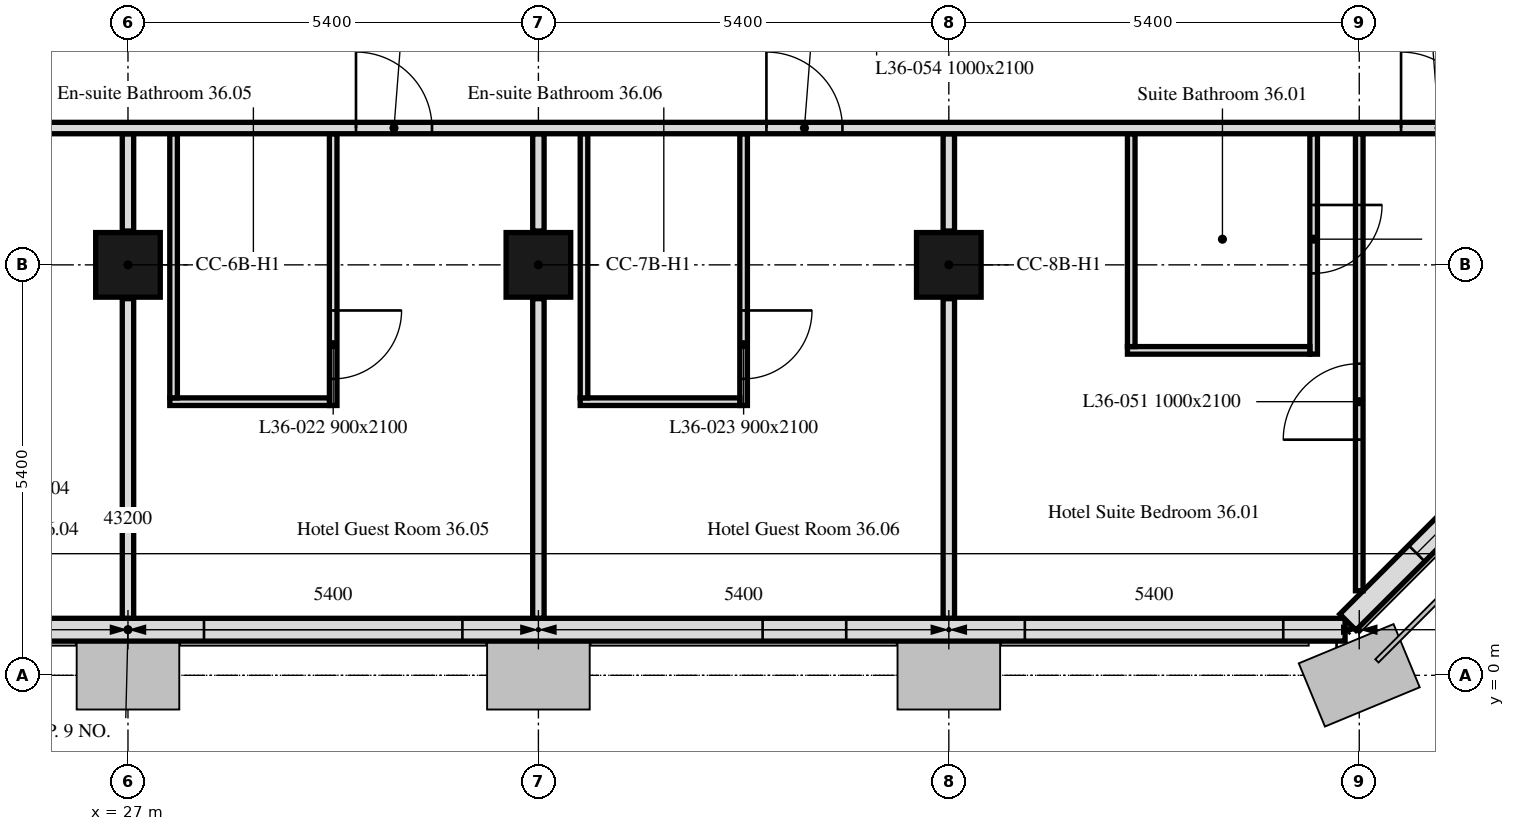
"""IFC4 building model, lengths in metres.
Left out: names, types, materials, properties, quantities, classifications, styles, units other than length and angle.
Written with IfcOpenShell. Run it as: python <this file> out.ifc"""

import sys

from ifc_helpers import new_model, si_unit, direction, frame, frame_2d, origin, origin_2d, place, context, subcontext, project, spatial, rectangle, extrude, element, fill, save


model = new_model("IFC4")
c1 = context("Model", 3, precision=1e-05, world=origin(), true_north=direction((0.0, 1.0)))
c2 = subcontext(c1, "Body", "Model", "MODEL_VIEW")
j1 = project(units=[si_unit("LENGTHUNIT", "METRE"), si_unit("PLANEANGLEUNIT", "RADIAN")], contexts=[c1])
p1 = place(None, origin())
s1 = spatial("IfcSite", under=j1, at=p1, CompositionType="ELEMENT")
p2 = place(p1, origin())
s2 = spatial("IfcBuilding", under=s1, at=p2, CompositionType="ELEMENT")
p3 = place(p2, frame((0.0, 0.0, 156.1)))
s3 = spatial("IfcBuildingStorey", under=s2, at=p3, CompositionType="ELEMENT", Elevation=156.1)
for number, where, z_axis, x_axis in (
    (1, (27.0, 5.4, 0.0), (0.0, 0.0, 1.0), (1.0, 0.0, 0.0)),
    (2, (32.4, 5.4, 0.0), (0.0, 0.0, 1.0), (1.0, 0.0, 0.0)),
    (3, (37.8, 5.4, 0.0), (0.0, 0.0, 1.0), (1.0, 0.0, 0.0)),
):
    element("IfcColumn", number, at=place(p3, frame(where, z_axis=z_axis, x_axis=x_axis)), inside=s3, PredefinedType="COLUMN", context=c2, shape_type="SweptSolid", body=[
        extrude(rectangle(XDim=0.85, YDim=0.85, at=origin_2d()), origin(), (0.0, 0.0, 1.0), 3.0),
    ])
p4 = place(p3, frame((10.986, 0.6, 0.0), z_axis=(0.0, 0.0, 1.0), x_axis=(1.0, 0.0, 0.0)))
e4 = element("IfcWall", 4, at=p4, inside=s3, PredefinedType="SOLIDWALL", context=c2, shape_type="SweptSolid", body=[
    extrude(rectangle(XDim=32.027, YDim=0.3, at=frame_2d((16.014, 0.0))), origin(), (0.0, 0.0, 1.0), 3.0),
])
p5 = place(p4, frame((2.764, 0.0, 0.9)))
e5 = element("IfcOpeningElement", 5, at=p5, cuts=e4, PredefinedType="OPENING", context=c2, shape_type="SweptSolid", body=[
    extrude(rectangle(XDim=1.1, YDim=1.7, at=frame_2d((0.55, 0.85))), frame((0.0, 0.16, 0.0), z_axis=(0.0, -1.0, 0.0), x_axis=(1.0, 0.0, 0.0)), (0.0, 0.0, 1.0), 0.32),
])
p6 = place(p4, frame((6.214, 0.0, 0.9)))
e6 = element("IfcOpeningElement", 6, at=p6, cuts=e4, PredefinedType="OPENING", context=c2, shape_type="SweptSolid", body=[
    extrude(rectangle(XDim=3.4, YDim=1.7, at=frame_2d((1.7, 0.85))), frame((0.0, 0.16, 0.0), z_axis=(0.0, -1.0, 0.0), x_axis=(1.0, 0.0, 0.0)), (0.0, 0.0, 1.0), 0.32),
])
p7 = place(p4, frame((13.564, 0.0, 0.9)))
e7 = element("IfcOpeningElement", 7, at=p7, cuts=e4, PredefinedType="OPENING", context=c2, shape_type="SweptSolid", body=[
    extrude(rectangle(XDim=1.1, YDim=1.7, at=frame_2d((0.55, 0.85))), frame((0.0, 0.16, 0.0), z_axis=(0.0, -1.0, 0.0), x_axis=(1.0, 0.0, 0.0)), (0.0, 0.0, 1.0), 0.32),
])
p8 = place(p4, frame((17.014, 0.0, 0.9)))
e8 = element("IfcOpeningElement", 8, at=p8, cuts=e4, PredefinedType="OPENING", context=c2, shape_type="SweptSolid", body=[
    extrude(rectangle(XDim=3.4, YDim=1.7, at=frame_2d((1.7, 0.85))), frame((0.0, 0.16, 0.0), z_axis=(0.0, -1.0, 0.0), x_axis=(1.0, 0.0, 0.0)), (0.0, 0.0, 1.0), 0.32),
])
p9 = place(p4, frame((24.364, 0.0, 0.9)))
e9 = element("IfcOpeningElement", 9, at=p9, cuts=e4, PredefinedType="OPENING", context=c2, shape_type="SweptSolid", body=[
    extrude(rectangle(XDim=1.1, YDim=1.7, at=frame_2d((0.55, 0.85))), frame((0.0, 0.16, 0.0), z_axis=(0.0, -1.0, 0.0), x_axis=(1.0, 0.0, 0.0)), (0.0, 0.0, 1.0), 0.32),
])
p10 = place(p4, frame((27.814, 0.0, 0.9)))
e10 = element("IfcOpeningElement", 10, at=p10, cuts=e4, PredefinedType="OPENING", context=c2, shape_type="SweptSolid", body=[
    extrude(rectangle(XDim=3.4, YDim=1.7, at=frame_2d((1.7, 0.85))), frame((0.0, 0.16, 0.0), z_axis=(0.0, -1.0, 0.0), x_axis=(1.0, 0.0, 0.0)), (0.0, 0.0, 1.0), 0.32),
])
p11 = place(p3, frame((43.051, 0.699, 0.0), z_axis=(0.0, 0.0, 1.0), x_axis=(0.707106781187, 0.707106781187, 0.0)))
e11 = element("IfcWall", 11, at=p11, inside=s3, PredefinedType="SOLIDWALL", context=c2, shape_type="SweptSolid", body=[
    extrude(rectangle(XDim=6.86, YDim=0.3, at=frame_2d((3.43, 0.0))), origin(), (0.0, 0.0, 1.0), 3.0),
])
p12 = place(p11, frame((1.28, 0.0, 0.9)))
e12 = element("IfcOpeningElement", 12, at=p12, cuts=e11, PredefinedType="OPENING", context=c2, shape_type="SweptSolid", body=[
    extrude(rectangle(XDim=1.1, YDim=1.7, at=frame_2d((0.55, 0.85))), frame((0.0, 0.16, 0.0), z_axis=(0.0, -1.0, 0.0), x_axis=(1.0, 0.0, 0.0)), (0.0, 0.0, 1.0), 0.32),
])
p13 = place(p11, frame((4.48, 0.0, 0.9)))
e13 = element("IfcOpeningElement", 13, at=p13, cuts=e11, PredefinedType="OPENING", context=c2, shape_type="SweptSolid", body=[
    extrude(rectangle(XDim=1.1, YDim=1.7, at=frame_2d((0.55, 0.85))), frame((0.0, 0.16, 0.0), z_axis=(0.0, -1.0, 0.0), x_axis=(1.0, 0.0, 0.0)), (0.0, 0.0, 1.0), 0.32),
])
p14 = place(p3, frame((27.0, 0.751, 0.0), z_axis=(0.0, 0.0, 1.0), x_axis=(0.0, 1.0, 0.0)))
e14 = element("IfcWall", 14, at=p14, inside=s3, PredefinedType="PARTITIONING", context=c2, shape_type="SweptSolid", body=[
    extrude(rectangle(XDim=4.204, YDim=0.15, at=frame_2d((2.102, 0.0))), origin(), (0.0, 0.0, 1.0), 2.4),
])
p15 = place(p3, frame((27.0, 5.845, 0.0), z_axis=(0.0, 0.0, 1.0), x_axis=(0.0, 1.0, 0.0)))
e15 = element("IfcWall", 15, at=p15, inside=s3, PredefinedType="PARTITIONING", context=c2, shape_type="SweptSolid", body=[
    extrude(rectangle(XDim=1.28, YDim=0.15, at=frame_2d((0.64, 0.0))), origin(), (0.0, 0.0, 1.0), 2.4),
])
p16 = place(p3, frame((32.4, 0.751, 0.0), z_axis=(0.0, 0.0, 1.0), x_axis=(0.0, 1.0, 0.0)))
e16 = element("IfcWall", 16, at=p16, inside=s3, PredefinedType="PARTITIONING", context=c2, shape_type="SweptSolid", body=[
    extrude(rectangle(XDim=4.204, YDim=0.15, at=frame_2d((2.102, 0.0))), origin(), (0.0, 0.0, 1.0), 2.4),
])
p17 = place(p3, frame((32.4, 5.845, 0.0), z_axis=(0.0, 0.0, 1.0), x_axis=(0.0, 1.0, 0.0)))
e17 = element("IfcWall", 17, at=p17, inside=s3, PredefinedType="PARTITIONING", context=c2, shape_type="SweptSolid", body=[
    extrude(rectangle(XDim=1.28, YDim=0.15, at=frame_2d((0.64, 0.0))), origin(), (0.0, 0.0, 1.0), 2.4),
])
p18 = place(p3, frame((29.7, 7.125, 0.0), z_axis=(0.0, 0.0, 1.0), x_axis=(0.0, -1.0, 0.0)))
e18 = element("IfcWall", 18, at=p18, inside=s3, PredefinedType="PARTITIONING", context=c2, shape_type="SweptSolid", body=[
    extrude(rectangle(XDim=3.575, YDim=0.1, at=frame_2d((1.788, 0.0))), origin(), (0.0, 0.0, 1.0), 3.0),
])
p19 = place(p18, frame((2.325, 0.0, 0.0)))
e19 = element("IfcOpeningElement", 19, at=p19, cuts=e18, PredefinedType="OPENING", context=c2, shape_type="SweptSolid", body=[
    extrude(rectangle(XDim=0.9, YDim=2.1, at=frame_2d((0.45, 1.05))), frame((0.0, 0.05, 0.0), z_axis=(0.0, -1.0, 0.0), x_axis=(1.0, 0.0, 0.0)), (0.0, 0.0, 1.0), 0.1),
])
p20 = place(p3, frame((29.65, 3.6, 0.0), z_axis=(0.0, 0.0, 1.0), x_axis=(-1.0, 0.0, 0.0)))
e20 = element("IfcWall", 20, at=p20, inside=s3, PredefinedType="PARTITIONING", context=c2, shape_type="SweptSolid", body=[
    extrude(rectangle(XDim=2.1, YDim=0.1, at=frame_2d((1.05, 0.0))), origin(), (0.0, 0.0, 1.0), 3.0),
])
p21 = place(p3, frame((27.6, 3.65, 0.0), z_axis=(0.0, 0.0, 1.0), x_axis=(0.0, 1.0, 0.0)))
e21 = element("IfcWall", 21, at=p21, inside=s3, PredefinedType="PARTITIONING", context=c2, shape_type="SweptSolid", body=[
    extrude(rectangle(XDim=3.475, YDim=0.1, at=frame_2d((1.738, 0.0))), origin(), (0.0, 0.0, 1.0), 3.0),
])
p22 = place(p3, frame((37.8, 0.751, 0.0), z_axis=(0.0, 0.0, 1.0), x_axis=(0.0, 1.0, 0.0)))
e22 = element("IfcWall", 22, at=p22, inside=s3, PredefinedType="PARTITIONING", context=c2, shape_type="SweptSolid", body=[
    extrude(rectangle(XDim=4.204, YDim=0.15, at=frame_2d((2.102, 0.0))), origin(), (0.0, 0.0, 1.0), 2.4),
])
p23 = place(p3, frame((37.8, 5.845, 0.0), z_axis=(0.0, 0.0, 1.0), x_axis=(0.0, 1.0, 0.0)))
e23 = element("IfcWall", 23, at=p23, inside=s3, PredefinedType="PARTITIONING", context=c2, shape_type="SweptSolid", body=[
    extrude(rectangle(XDim=1.28, YDim=0.15, at=frame_2d((0.64, 0.0))), origin(), (0.0, 0.0, 1.0), 2.4),
])
p24 = place(p3, frame((35.1, 7.125, 0.0), z_axis=(0.0, 0.0, 1.0), x_axis=(0.0, -1.0, 0.0)))
e24 = element("IfcWall", 24, at=p24, inside=s3, PredefinedType="PARTITIONING", context=c2, shape_type="SweptSolid", body=[
    extrude(rectangle(XDim=3.575, YDim=0.1, at=frame_2d((1.788, 0.0))), origin(), (0.0, 0.0, 1.0), 3.0),
])
p25 = place(p24, frame((2.325, 0.0, 0.0)))
e25 = element("IfcOpeningElement", 25, at=p25, cuts=e24, PredefinedType="OPENING", context=c2, shape_type="SweptSolid", body=[
    extrude(rectangle(XDim=0.9, YDim=2.1, at=frame_2d((0.45, 1.05))), frame((0.0, 0.05, 0.0), z_axis=(0.0, -1.0, 0.0), x_axis=(1.0, 0.0, 0.0)), (0.0, 0.0, 1.0), 0.1),
])
p26 = place(p3, frame((35.05, 3.6, 0.0), z_axis=(0.0, 0.0, 1.0), x_axis=(-1.0, 0.0, 0.0)))
e26 = element("IfcWall", 26, at=p26, inside=s3, PredefinedType="PARTITIONING", context=c2, shape_type="SweptSolid", body=[
    extrude(rectangle(XDim=2.1, YDim=0.1, at=frame_2d((1.05, 0.0))), origin(), (0.0, 0.0, 1.0), 3.0),
])
p27 = place(p3, frame((33.0, 3.65, 0.0), z_axis=(0.0, 0.0, 1.0), x_axis=(0.0, 1.0, 0.0)))
e27 = element("IfcWall", 27, at=p27, inside=s3, PredefinedType="PARTITIONING", context=c2, shape_type="SweptSolid", body=[
    extrude(rectangle(XDim=3.475, YDim=0.1, at=frame_2d((1.738, 0.0))), origin(), (0.0, 0.0, 1.0), 3.0),
])
p28 = place(p3, frame((43.2, 1.112, 0.0), z_axis=(0.0, 0.0, 1.0), x_axis=(0.0, 1.0, 0.0)))
e28 = element("IfcWall", 28, at=p28, inside=s3, PredefinedType="PARTITIONING", context=c2, shape_type="SweptSolid", body=[
    extrude(rectangle(XDim=6.013, YDim=0.1, at=frame_2d((3.006, 0.0))), origin(), (0.0, 0.0, 1.0), 3.0),
])
p29 = place(p28, frame((1.988, 0.0, 0.0)))
e29 = element("IfcOpeningElement", 29, at=p29, cuts=e28, PredefinedType="OPENING", context=c2, shape_type="SweptSolid", body=[
    extrude(rectangle(XDim=1.0, YDim=2.1, at=frame_2d((0.5, 1.05))), frame((0.0, 0.05, 0.0), z_axis=(0.0, -1.0, 0.0), x_axis=(1.0, 0.0, 0.0)), (0.0, 0.0, 1.0), 0.1),
])
p30 = place(p3, frame((42.6, 7.125, 0.0), z_axis=(0.0, 0.0, 1.0), x_axis=(0.0, -1.0, 0.0)))
e30 = element("IfcWall", 30, at=p30, inside=s3, PredefinedType="PARTITIONING", context=c2, shape_type="SweptSolid", body=[
    extrude(rectangle(XDim=2.9, YDim=0.1, at=frame_2d((1.45, 0.0))), origin(), (0.0, 0.0, 1.0), 3.0),
])
p31 = place(p30, frame((0.937, 0.0, 0.0)))
e31 = element("IfcOpeningElement", 31, at=p31, cuts=e30, PredefinedType="OPENING", context=c2, shape_type="SweptSolid", body=[
    extrude(rectangle(XDim=0.9, YDim=2.1, at=frame_2d((0.45, 1.05))), frame((0.0, 0.05, 0.0), z_axis=(0.0, -1.0, 0.0), x_axis=(1.0, 0.0, 0.0)), (0.0, 0.0, 1.0), 0.1),
])
p32 = place(p3, frame((42.55, 4.275, 0.0), z_axis=(0.0, 0.0, 1.0), x_axis=(-1.0, 0.0, 0.0)))
e32 = element("IfcWall", 32, at=p32, inside=s3, PredefinedType="PARTITIONING", context=c2, shape_type="SweptSolid", body=[
    extrude(rectangle(XDim=2.4, YDim=0.1, at=frame_2d((1.2, 0.0))), origin(), (0.0, 0.0, 1.0), 3.0),
])
p33 = place(p3, frame((40.2, 4.325, 0.0), z_axis=(0.0, 0.0, 1.0), x_axis=(0.0, 1.0, 0.0)))
e33 = element("IfcWall", 33, at=p33, inside=s3, PredefinedType="PARTITIONING", context=c2, shape_type="SweptSolid", body=[
    extrude(rectangle(XDim=2.8, YDim=0.1, at=frame_2d((1.4, 0.0))), origin(), (0.0, 0.0, 1.0), 3.0),
])
p34 = place(p3, frame((6.151, 7.2, 0.0), z_axis=(0.0, 0.0, 1.0), x_axis=(1.0, 0.0, 0.0)))
e34 = element("IfcWall", 34, at=p34, inside=s3, PredefinedType="PARTITIONING", context=c2, shape_type="SweptSolid", body=[
    extrude(rectangle(XDim=41.698, YDim=0.15, at=frame_2d((20.849, 0.0))), origin(), (0.0, 0.0, 1.0), 2.4),
])
p35 = place(p34, frame((2.249, 0.0, 0.0)))
e35 = element("IfcOpeningElement", 35, at=p35, cuts=e34, PredefinedType="OPENING", context=c2, shape_type="SweptSolid", body=[
    extrude(rectangle(XDim=1.0, YDim=2.1, at=frame_2d((0.5, 1.05))), frame((0.0, 0.075, 0.0), z_axis=(0.0, -1.0, 0.0), x_axis=(1.0, 0.0, 0.0)), (0.0, 0.0, 1.0), 0.15),
])
p36 = place(p34, frame((7.649, 0.0, 0.0)))
e36 = element("IfcOpeningElement", 36, at=p36, cuts=e34, PredefinedType="OPENING", context=c2, shape_type="SweptSolid", body=[
    extrude(rectangle(XDim=1.0, YDim=2.1, at=frame_2d((0.5, 1.05))), frame((0.0, 0.075, 0.0), z_axis=(0.0, -1.0, 0.0), x_axis=(1.0, 0.0, 0.0)), (0.0, 0.0, 1.0), 0.15),
])
p37 = place(p34, frame((13.049, 0.0, 0.0)))
e37 = element("IfcOpeningElement", 37, at=p37, cuts=e34, PredefinedType="OPENING", context=c2, shape_type="SweptSolid", body=[
    extrude(rectangle(XDim=1.0, YDim=2.1, at=frame_2d((0.5, 1.05))), frame((0.0, 0.075, 0.0), z_axis=(0.0, -1.0, 0.0), x_axis=(1.0, 0.0, 0.0)), (0.0, 0.0, 1.0), 0.15),
])
p38 = place(p34, frame((18.449, 0.0, 0.0)))
e38 = element("IfcOpeningElement", 38, at=p38, cuts=e34, PredefinedType="OPENING", context=c2, shape_type="SweptSolid", body=[
    extrude(rectangle(XDim=1.0, YDim=2.1, at=frame_2d((0.5, 1.05))), frame((0.0, 0.075, 0.0), z_axis=(0.0, -1.0, 0.0), x_axis=(1.0, 0.0, 0.0)), (0.0, 0.0, 1.0), 0.15),
])
p39 = place(p34, frame((23.849, 0.0, 0.0)))
e39 = element("IfcOpeningElement", 39, at=p39, cuts=e34, PredefinedType="OPENING", context=c2, shape_type="SweptSolid", body=[
    extrude(rectangle(XDim=1.0, YDim=2.1, at=frame_2d((0.5, 1.05))), frame((0.0, 0.075, 0.0), z_axis=(0.0, -1.0, 0.0), x_axis=(1.0, 0.0, 0.0)), (0.0, 0.0, 1.0), 0.15),
])
p40 = place(p34, frame((29.249, 0.0, 0.0)))
e40 = element("IfcOpeningElement", 40, at=p40, cuts=e34, PredefinedType="OPENING", context=c2, shape_type="SweptSolid", body=[
    extrude(rectangle(XDim=1.0, YDim=2.1, at=frame_2d((0.5, 1.05))), frame((0.0, 0.075, 0.0), z_axis=(0.0, -1.0, 0.0), x_axis=(1.0, 0.0, 0.0)), (0.0, 0.0, 1.0), 0.15),
])
p41 = place(p34, frame((37.599, 0.0, 0.0)))
e41 = element("IfcOpeningElement", 41, at=p41, cuts=e34, PredefinedType="OPENING", context=c2, shape_type="SweptSolid", body=[
    extrude(rectangle(XDim=1.0, YDim=2.1, at=frame_2d((0.5, 1.05))), frame((0.0, 0.075, 0.0), z_axis=(0.0, -1.0, 0.0), x_axis=(1.0, 0.0, 0.0)), (0.0, 0.0, 1.0), 0.15),
])
p42 = place(p8, origin())
e42 = element("IfcWindow", 42, at=p42, inside=s3, PartitioningType="SINGLE_PANEL", PredefinedType="WINDOW", context=c2, shape_type="SweptSolid", body=[
    extrude(rectangle(XDim=3.4, YDim=1.7, at=frame_2d((1.7, 0.85))), frame((0.0, 0.03, 0.0), z_axis=(0.0, -1.0, 0.0), x_axis=(1.0, 0.0, 0.0)), (0.0, 0.0, 1.0), 0.06),
])
fill(e8, e42)
p43 = place(p9, origin())
e43 = element("IfcWindow", 43, at=p43, inside=s3, PartitioningType="SINGLE_PANEL", PredefinedType="WINDOW", context=c2, shape_type="SweptSolid", body=[
    extrude(rectangle(XDim=1.1, YDim=1.7, at=frame_2d((0.55, 0.85))), frame((0.0, 0.03, 0.0), z_axis=(0.0, -1.0, 0.0), x_axis=(1.0, 0.0, 0.0)), (0.0, 0.0, 1.0), 0.06),
])
fill(e9, e43)
p44 = place(p10, origin())
e44 = element("IfcWindow", 44, at=p44, inside=s3, PartitioningType="SINGLE_PANEL", PredefinedType="WINDOW", context=c2, shape_type="SweptSolid", body=[
    extrude(rectangle(XDim=3.4, YDim=1.7, at=frame_2d((1.7, 0.85))), frame((0.0, 0.03, 0.0), z_axis=(0.0, -1.0, 0.0), x_axis=(1.0, 0.0, 0.0)), (0.0, 0.0, 1.0), 0.06),
])
fill(e10, e44)
p45 = place(p12, origin())
e45 = element("IfcWindow", 45, at=p45, inside=s3, PartitioningType="SINGLE_PANEL", PredefinedType="WINDOW", context=c2, shape_type="SweptSolid", body=[
    extrude(rectangle(XDim=1.1, YDim=1.7, at=frame_2d((0.55, 0.85))), frame((0.0, 0.03, 0.0), z_axis=(0.0, -1.0, 0.0), x_axis=(1.0, 0.0, 0.0)), (0.0, 0.0, 1.0), 0.06),
])
fill(e12, e45)
p46 = place(p19, origin())
e46 = element("IfcDoor", 46, at=p46, inside=s3, OperationType="SINGLE_SWING_RIGHT", PredefinedType="DOOR", context=c2, shape_type="SweptSolid", body=[
    extrude(rectangle(XDim=0.9, YDim=2.1, at=frame_2d((0.45, 1.05))), frame((0.0, 0.025, 0.0), z_axis=(0.0, -1.0, 0.0), x_axis=(1.0, 0.0, 0.0)), (0.0, 0.0, 1.0), 0.05),
])
fill(e19, e46)
p47 = place(p25, origin())
e47 = element("IfcDoor", 47, at=p47, inside=s3, OperationType="SINGLE_SWING_RIGHT", PredefinedType="DOOR", context=c2, shape_type="SweptSolid", body=[
    extrude(rectangle(XDim=0.9, YDim=2.1, at=frame_2d((0.45, 1.05))), frame((0.0, 0.025, 0.0), z_axis=(0.0, -1.0, 0.0), x_axis=(1.0, 0.0, 0.0)), (0.0, 0.0, 1.0), 0.05),
])
fill(e25, e47)
p48 = place(p31, origin())
e48 = element("IfcDoor", 48, at=p48, inside=s3, OperationType="SINGLE_SWING_LEFT", PredefinedType="DOOR", context=c2, shape_type="SweptSolid", body=[
    extrude(rectangle(XDim=0.9, YDim=2.1, at=frame_2d((0.45, 1.05))), frame((0.0, 0.025, 0.0), z_axis=(0.0, -1.0, 0.0), x_axis=(1.0, 0.0, 0.0)), (0.0, 0.0, 1.0), 0.05),
])
fill(e31, e48)
p49 = place(p39, origin())
e49 = element("IfcDoor", 49, at=p49, inside=s3, OperationType="SINGLE_SWING_RIGHT", PredefinedType="DOOR", context=c2, shape_type="SweptSolid", body=[
    extrude(rectangle(XDim=1.0, YDim=2.1, at=frame_2d((0.5, 1.05))), frame((0.0, 0.025, 0.0), z_axis=(0.0, -1.0, 0.0), x_axis=(1.0, 0.0, 0.0)), (0.0, 0.0, 1.0), 0.05),
])
fill(e39, e49)
p50 = place(p40, origin())
e50 = element("IfcDoor", 50, at=p50, inside=s3, OperationType="SINGLE_SWING_LEFT", PredefinedType="DOOR", context=c2, shape_type="SweptSolid", body=[
    extrude(rectangle(XDim=1.0, YDim=2.1, at=frame_2d((0.5, 1.05))), frame((0.0, 0.025, 0.0), z_axis=(0.0, -1.0, 0.0), x_axis=(1.0, 0.0, 0.0)), (0.0, 0.0, 1.0), 0.05),
])
fill(e40, e50)
p51 = place(p29, origin())
e51 = element("IfcDoor", 51, at=p51, inside=s3, OperationType="SINGLE_SWING_LEFT", PredefinedType="DOOR", context=c2, shape_type="SweptSolid", body=[
    extrude(rectangle(XDim=1.0, YDim=2.1, at=frame_2d((0.5, 1.05))), frame((0.0, 0.025, 0.0), z_axis=(0.0, -1.0, 0.0), x_axis=(1.0, 0.0, 0.0)), (0.0, 0.0, 1.0), 0.05),
])
fill(e29, e51)
p52 = place(p41, origin())
e52 = element("IfcDoor", 52, at=p52, inside=s3, OperationType="SINGLE_SWING_RIGHT", PredefinedType="DOOR", context=c2, shape_type="SweptSolid", body=[
    extrude(rectangle(XDim=1.0, YDim=2.1, at=frame_2d((0.5, 1.05))), frame((0.0, 0.025, 0.0), z_axis=(0.0, -1.0, 0.0), x_axis=(1.0, 0.0, 0.0)), (0.0, 0.0, 1.0), 0.05),
])
fill(e41, e52)
save(model, sys.argv[1])
